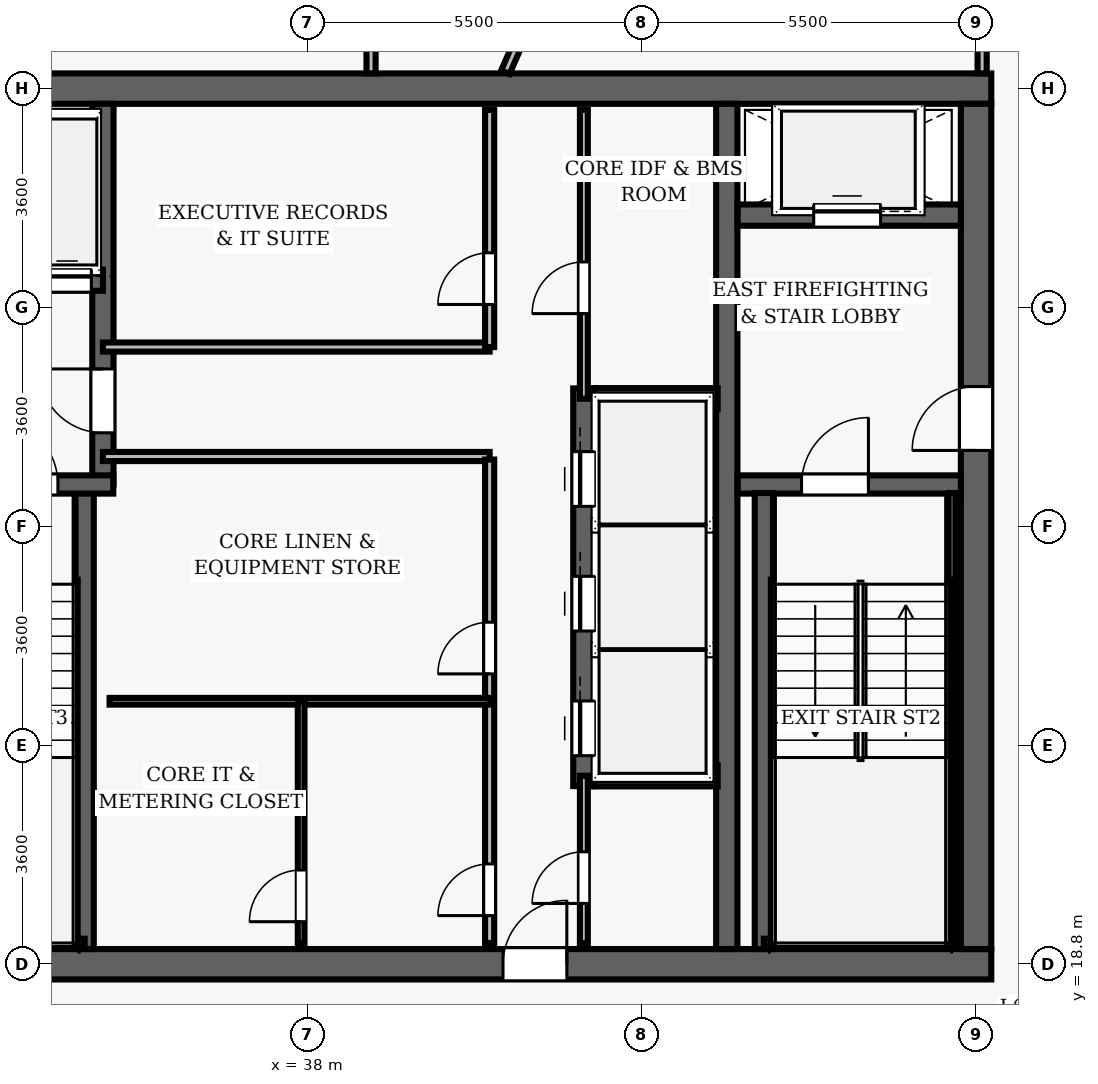
"""IFC4 building model, lengths in metres.
Left out: names, types, materials, properties, quantities, classifications, styles, units other than length and angle.
Written with IfcOpenShell. Run it as: python <this file> out.ifc"""

import sys

from ifc_helpers import new_model, si_unit, direction, frame, frame_2d, origin, place, context, subcontext, project, spatial, rectangle, extrude, element, fill, save


model = new_model("IFC4")
c1 = context("Model", 3, precision=1e-05, world=origin(), true_north=direction((0.0, 1.0)))
c2 = subcontext(c1, "Body", "Model", "MODEL_VIEW")
j1 = project(units=[si_unit("LENGTHUNIT", "METRE"), si_unit("PLANEANGLEUNIT", "RADIAN")], contexts=[c1])
p1 = place(None, origin())
s1 = spatial("IfcSite", under=j1, at=p1, CompositionType="ELEMENT")
p2 = place(p1, origin())
s2 = spatial("IfcBuilding", under=s1, at=p2, CompositionType="ELEMENT")
p3 = place(p2, frame((0.0, 0.0, 265.15)))
s3 = spatial("IfcBuildingStorey", under=s2, at=p3, CompositionType="ELEMENT", Elevation=265.15)
p4 = place(p3, frame((26.75, 18.8, 0.0), z_axis=(0.0, 0.0, 1.0), x_axis=(1.0, 0.0, 0.0)))
e1 = element("IfcWall", 1, at=p4, inside=s3, PredefinedType="SHEAR", context=c2, shape_type="SweptSolid", body=[
    extrude(rectangle(XDim=22.5, YDim=0.5, at=frame_2d((11.25, 0.0))), origin(), (0.0, 0.0, 1.0), 3.85),
])
p5 = place(p4, frame((14.47, 0.0, 0.0)))
e2 = element("IfcOpeningElement", 2, at=p5, cuts=e1, PredefinedType="OPENING", context=c2, shape_type="SweptSolid", body=[
    extrude(rectangle(XDim=1.05, YDim=2.15, at=frame_2d((0.525, 1.075))), frame((0.0, 0.26, 0.0), z_axis=(0.0, -1.0, 0.0), x_axis=(1.0, 0.0, 0.0)), (0.0, 0.0, 1.0), 0.52),
])
p6 = place(p3, frame((26.75, 33.2, 0.0), z_axis=(0.0, 0.0, 1.0), x_axis=(1.0, 0.0, 0.0)))
e3 = element("IfcWall", 3, at=p6, inside=s3, PredefinedType="SHEAR", context=c2, shape_type="SweptSolid", body=[
    extrude(rectangle(XDim=22.5, YDim=0.5, at=frame_2d((11.25, 0.0))), origin(), (0.0, 0.0, 1.0), 3.85),
])
p7 = place(p3, frame((49.0, 19.05, 0.0), z_axis=(0.0, 0.0, 1.0), x_axis=(0.0, 1.0, 0.0)))
e4 = element("IfcWall", 4, at=p7, inside=s3, PredefinedType="SHEAR", context=c2, shape_type="SweptSolid", body=[
    extrude(rectangle(XDim=13.9, YDim=0.5, at=frame_2d((6.95, 0.0))), origin(), (0.0, 0.0, 1.0), 3.85),
])
p8 = place(p7, frame((8.2, 0.0, 0.0)))
e5 = element("IfcOpeningElement", 5, at=p8, cuts=e4, PredefinedType="OPENING", context=c2, shape_type="SweptSolid", body=[
    extrude(rectangle(XDim=1.05, YDim=2.15, at=frame_2d((0.525, 1.075))), frame((0.0, 0.26, 0.0), z_axis=(0.0, -1.0, 0.0), x_axis=(1.0, 0.0, 0.0)), (0.0, 0.0, 1.0), 0.52),
])
p9 = place(p3, frame((44.9, 19.05, 0.0), z_axis=(0.0, 0.0, 1.0), x_axis=(0.0, 1.0, 0.0)))
e6 = element("IfcWall", 6, at=p9, inside=s3, PredefinedType="SHEAR", context=c2, shape_type="SweptSolid", body=[
    extrude(rectangle(XDim=13.9, YDim=0.35, at=frame_2d((6.95, 0.0))), origin(), (0.0, 0.0, 1.0), 3.85),
])
p10 = place(p3, frame((45.08, 26.69, 0.0), z_axis=(0.0, 0.0, 1.0), x_axis=(1.0, 0.0, 0.0)))
e7 = element("IfcWall", 7, at=p10, inside=s3, PredefinedType="SHEAR", context=c2, shape_type="SweptSolid", body=[
    extrude(rectangle(XDim=3.67, YDim=0.3, at=frame_2d((1.835, 0.0))), origin(), (0.0, 0.0, 1.0), 3.85),
])
p11 = place(p10, frame((1.05, 0.0, 0.0)))
e8 = element("IfcOpeningElement", 8, at=p11, cuts=e7, PredefinedType="OPENING", context=c2, shape_type="SweptSolid", body=[
    extrude(rectangle(XDim=1.1, YDim=2.15, at=frame_2d((0.55, 1.075))), frame((0.0, 0.16, 0.0), z_axis=(0.0, -1.0, 0.0), x_axis=(1.0, 0.0, 0.0)), (0.0, 0.0, 1.0), 0.32),
])
p12 = place(p3, frame((45.51, 19.05, 0.0), z_axis=(0.0, 0.0, 1.0), x_axis=(0.0, 1.0, 0.0)))
e9 = element("IfcWall", 9, at=p12, inside=s3, PredefinedType="SHEAR", context=c2, shape_type="SweptSolid", body=[
    extrude(rectangle(XDim=7.5, YDim=0.3, at=frame_2d((3.75, 0.0))), origin(), (0.0, 0.0, 1.0), 3.85),
])
p13 = place(p3, frame((48.605, 19.1, 0.0), z_axis=(0.0, 0.0, 1.0), x_axis=(0.0, 1.0, 0.0)))
e10 = element("IfcWall", 10, at=p13, inside=s3, PredefinedType="SHEAR", context=c2, shape_type="SweptSolid", body=[
    extrude(rectangle(XDim=7.45, YDim=0.12, at=frame_2d((3.725, 0.0))), origin(), (0.0, 0.0, 1.0), 3.85),
])
p14 = place(p3, frame((45.51, 19.16, 0.0), z_axis=(0.0, 0.0, 1.0), x_axis=(1.0, 0.0, 0.0)))
e11 = element("IfcWall", 11, at=p14, inside=s3, PredefinedType="SHEAR", context=c2, shape_type="SweptSolid", body=[
    extrude(rectangle(XDim=3.095, YDim=0.12, at=frame_2d((1.547, 0.0))), origin(), (0.0, 0.0, 1.0), 3.85),
])
p15 = place(p3, frame((45.08, 31.12, 0.0), z_axis=(0.0, 0.0, 1.0), x_axis=(1.0, 0.0, 0.0)))
e12 = element("IfcWall", 12, at=p15, inside=s3, PredefinedType="SHEAR", context=c2, shape_type="SweptSolid", body=[
    extrude(rectangle(XDim=3.67, YDim=0.35, at=frame_2d((1.835, 0.0))), origin(), (0.0, 0.0, 1.0), 3.04),
])
p16 = place(p15, frame((1.25, 0.0, 0.0)))
e13 = element("IfcOpeningElement", 13, at=p16, cuts=e12, PredefinedType="OPENING", context=c2, shape_type="SweptSolid", body=[
    extrude(rectangle(XDim=1.1, YDim=2.15, at=frame_2d((0.55, 1.075))), frame((0.0, 0.185, 0.0), z_axis=(0.0, -1.0, 0.0), x_axis=(1.0, 0.0, 0.0)), (0.0, 0.0, 1.0), 0.37),
])
p17 = place(p3, frame((34.34, 19.05, 0.0), z_axis=(0.0, 0.0, 1.0), x_axis=(0.0, 1.0, 0.0)))
e14 = element("IfcWall", 14, at=p17, inside=s3, PredefinedType="SHEAR", context=c2, shape_type="SweptSolid", body=[
    extrude(rectangle(XDim=7.5, YDim=0.3, at=frame_2d((3.75, 0.0))), origin(), (0.0, 0.0, 1.0), 3.85),
])
p18 = place(p3, frame((34.64, 26.69, 0.0), z_axis=(0.0, 0.0, 1.0), x_axis=(0.0, 1.0, 0.0)))
e15 = element("IfcWall", 15, at=p18, inside=s3, PredefinedType="SHEAR", context=c2, shape_type="SweptSolid", body=[
    extrude(rectangle(XDim=6.26, YDim=0.35, at=frame_2d((3.13, 0.0))), origin(), (0.0, 0.0, 1.0), 3.85),
])
p19 = place(p18, frame((0.85, 0.0, 0.0)))
e16 = element("IfcOpeningElement", 16, at=p19, cuts=e15, PredefinedType="OPENING", context=c2, shape_type="SweptSolid", body=[
    extrude(rectangle(XDim=1.05, YDim=2.15, at=frame_2d((0.525, 1.075))), frame((0.0, 0.185, 0.0), z_axis=(0.0, -1.0, 0.0), x_axis=(1.0, 0.0, 0.0)), (0.0, 0.0, 1.0), 0.37),
])
p20 = place(p3, frame((31.25, 26.69, 0.0), z_axis=(0.0, 0.0, 1.0), x_axis=(1.0, 0.0, 0.0)))
e17 = element("IfcWall", 17, at=p20, inside=s3, PredefinedType="SHEAR", context=c2, shape_type="SweptSolid", body=[
    extrude(rectangle(XDim=3.56, YDim=0.3, at=frame_2d((1.78, 0.0))), origin(), (0.0, 0.0, 1.0), 3.85),
])
p21 = place(p20, frame((1.55, 0.0, 0.0)))
e18 = element("IfcOpeningElement", 18, at=p21, cuts=e17, PredefinedType="OPENING", context=c2, shape_type="SweptSolid", body=[
    extrude(rectangle(XDim=1.1, YDim=2.15, at=frame_2d((0.55, 1.075))), frame((0.0, 0.16, 0.0), z_axis=(0.0, -1.0, 0.0), x_axis=(1.0, 0.0, 0.0)), (0.0, 0.0, 1.0), 0.32),
])
p22 = place(p3, frame((31.3, 19.16, 0.0), z_axis=(0.0, 0.0, 1.0), x_axis=(1.0, 0.0, 0.0)))
e19 = element("IfcWall", 19, at=p22, inside=s3, PredefinedType="SHEAR", context=c2, shape_type="SweptSolid", body=[
    extrude(rectangle(XDim=3.04, YDim=0.12, at=frame_2d((1.52, 0.0))), origin(), (0.0, 0.0, 1.0), 3.85),
])
p23 = place(p3, frame((32.23, 30.05, 0.0), z_axis=(0.0, 0.0, 1.0), x_axis=(1.0, 0.0, 0.0)))
e20 = element("IfcWall", 20, at=p23, inside=s3, PredefinedType="SHEAR", context=c2, shape_type="SweptSolid", body=[
    extrude(rectangle(XDim=2.41, YDim=0.35, at=frame_2d((1.205, 0.0))), origin(), (0.0, 0.0, 1.0), 3.04),
])
p24 = place(p23, frame((0.42, 0.0, 0.0)))
e21 = element("IfcOpeningElement", 21, at=p24, cuts=e20, PredefinedType="OPENING", context=c2, shape_type="SweptSolid", body=[
    extrude(rectangle(XDim=0.8, YDim=2.15, at=frame_2d((0.4, 1.075))), frame((0.0, 0.185, 0.0), z_axis=(0.0, -1.0, 0.0), x_axis=(1.0, 0.0, 0.0)), (0.0, 0.0, 1.0), 0.37),
])
p25 = place(p23, frame((1.42, 0.0, 0.0)))
e22 = element("IfcOpeningElement", 22, at=p25, cuts=e20, PredefinedType="OPENING", context=c2, shape_type="SweptSolid", body=[
    extrude(rectangle(XDim=0.8, YDim=2.15, at=frame_2d((0.4, 1.075))), frame((0.0, 0.185, 0.0), z_axis=(0.0, -1.0, 0.0), x_axis=(1.0, 0.0, 0.0)), (0.0, 0.0, 1.0), 0.37),
])
p26 = place(p3, frame((42.55, 21.73, 0.0), z_axis=(0.0, 0.0, 1.0), x_axis=(0.0, 1.0, 0.0)))
e23 = element("IfcWall", 23, at=p26, inside=s3, PredefinedType="SHEAR", context=c2, shape_type="SweptSolid", body=[
    extrude(rectangle(XDim=6.54, YDim=0.35, at=frame_2d((3.27, 0.0))), origin(), (0.0, 0.0, 1.0), 3.04),
])
p27 = place(p26, frame((0.5, 0.0, 0.0)))
e24 = element("IfcOpeningElement", 24, at=p27, cuts=e23, PredefinedType="OPENING", context=c2, shape_type="SweptSolid", body=[
    extrude(rectangle(XDim=0.9, YDim=2.15, at=frame_2d((0.45, 1.075))), frame((0.0, 0.185, 0.0), z_axis=(0.0, -1.0, 0.0), x_axis=(1.0, 0.0, 0.0)), (0.0, 0.0, 1.0), 0.37),
])
p28 = place(p26, frame((2.55, 0.0, 0.0)))
e25 = element("IfcOpeningElement", 25, at=p28, cuts=e23, PredefinedType="OPENING", context=c2, shape_type="SweptSolid", body=[
    extrude(rectangle(XDim=0.9, YDim=2.15, at=frame_2d((0.45, 1.075))), frame((0.0, 0.185, 0.0), z_axis=(0.0, -1.0, 0.0), x_axis=(1.0, 0.0, 0.0)), (0.0, 0.0, 1.0), 0.37),
])
p29 = place(p26, frame((4.6, 0.0, 0.0)))
e26 = element("IfcOpeningElement", 26, at=p29, cuts=e23, PredefinedType="OPENING", context=c2, shape_type="SweptSolid", body=[
    extrude(rectangle(XDim=0.9, YDim=2.15, at=frame_2d((0.45, 1.075))), frame((0.0, 0.185, 0.0), z_axis=(0.0, -1.0, 0.0), x_axis=(1.0, 0.0, 0.0)), (0.0, 0.0, 1.0), 0.37),
])
for number, where, z_axis, x_axis in (
    (27, (42.72, 21.9, 0.0), (0.0, 0.0, 1.0), (1.0, 0.0, 0.0)),
    (28, (42.72, 28.1, 0.0), (0.0, 0.0, 1.0), (1.0, 0.0, 0.0)),
):
    element("IfcWall", number, at=place(p3, frame(where, z_axis=z_axis, x_axis=x_axis)), inside=s3, PredefinedType="SHEAR", context=c2, shape_type="SweptSolid", body=[
        extrude(rectangle(XDim=2.03, YDim=0.35, at=frame_2d((1.015, 0.0))), origin(), (0.0, 0.0, 1.0), 3.04),
    ])
for number, where, z_axis, x_axis in (
    (29, (34.64, 27.15, 0.0), (0.0, 0.0, 1.0), (1.0, 0.0, 0.0)),
    (30, (34.64, 28.95, 0.0), (0.0, 0.0, 1.0), (1.0, 0.0, 0.0)),
):
    element("IfcWall", number, at=place(p3, frame(where, z_axis=z_axis, x_axis=x_axis)), inside=s3, PredefinedType="PARTITIONING", context=c2, shape_type="SweptSolid", body=[
        extrude(rectangle(XDim=6.36, YDim=0.15, at=frame_2d((3.18, 0.0))), origin(), (0.0, 0.0, 1.0), 3.04),
    ])
p30 = place(p3, frame((41.0, 28.95, 0.0), z_axis=(0.0, 0.0, 1.0), x_axis=(0.0, 1.0, 0.0)))
e31 = element("IfcWall", 31, at=p30, inside=s3, PredefinedType="PARTITIONING", context=c2, shape_type="SweptSolid", body=[
    extrude(rectangle(XDim=3.9, YDim=0.15, at=frame_2d((1.95, 0.0))), origin(), (0.0, 0.0, 1.0), 3.04),
])
p31 = place(p30, frame((0.7, 0.0, 0.0)))
e32 = element("IfcOpeningElement", 32, at=p31, cuts=e31, PredefinedType="OPENING", context=c2, shape_type="SweptSolid", body=[
    extrude(rectangle(XDim=0.85, YDim=2.1, at=frame_2d((0.425, 1.05))), frame((0.0, 0.085, 0.0), z_axis=(0.0, -1.0, 0.0), x_axis=(1.0, 0.0, 0.0)), (0.0, 0.0, 1.0), 0.17),
])
p32 = place(p3, frame((41.0, 19.15, 0.0), z_axis=(0.0, 0.0, 1.0), x_axis=(0.0, 1.0, 0.0)))
e33 = element("IfcWall", 33, at=p32, inside=s3, PredefinedType="PARTITIONING", context=c2, shape_type="SweptSolid", body=[
    extrude(rectangle(XDim=7.95, YDim=0.15, at=frame_2d((3.975, 0.0))), origin(), (0.0, 0.0, 1.0), 3.04),
])
p33 = place(p32, frame((4.425, 0.0, 0.0)))
e34 = element("IfcOpeningElement", 34, at=p33, cuts=e33, PredefinedType="OPENING", context=c2, shape_type="SweptSolid", body=[
    extrude(rectangle(XDim=0.85, YDim=2.1, at=frame_2d((0.425, 1.05))), frame((0.0, 0.085, 0.0), z_axis=(0.0, -1.0, 0.0), x_axis=(1.0, 0.0, 0.0)), (0.0, 0.0, 1.0), 0.17),
])
p34 = place(p32, frame((0.45, 0.0, 0.0)))
e35 = element("IfcOpeningElement", 35, at=p34, cuts=e33, PredefinedType="OPENING", context=c2, shape_type="SweptSolid", body=[
    extrude(rectangle(XDim=0.85, YDim=2.1, at=frame_2d((0.425, 1.05))), frame((0.0, 0.085, 0.0), z_axis=(0.0, -1.0, 0.0), x_axis=(1.0, 0.0, 0.0)), (0.0, 0.0, 1.0), 0.17),
])
p35 = place(p3, frame((34.75, 23.125, 0.0), z_axis=(0.0, 0.0, 1.0), x_axis=(1.0, 0.0, 0.0)))
e36 = element("IfcWall", 36, at=p35, inside=s3, PredefinedType="PARTITIONING", context=c2, shape_type="SweptSolid", body=[
    extrude(rectangle(XDim=6.25, YDim=0.11, at=frame_2d((3.125, 0.0))), origin(), (0.0, 0.0, 1.0), 3.04),
])
p36 = place(p3, frame((37.9, 19.15, 0.0), z_axis=(0.0, 0.0, 1.0), x_axis=(0.0, 1.0, 0.0)))
e37 = element("IfcWall", 37, at=p36, inside=s3, PredefinedType="PARTITIONING", context=c2, shape_type="SweptSolid", body=[
    extrude(rectangle(XDim=3.975, YDim=0.11, at=frame_2d((1.988, 0.0))), origin(), (0.0, 0.0, 1.0), 3.04),
])
p37 = place(p36, frame((0.35, 0.0, 0.0)))
e38 = element("IfcOpeningElement", 38, at=p37, cuts=e37, PredefinedType="OPENING", context=c2, shape_type="SweptSolid", body=[
    extrude(rectangle(XDim=0.85, YDim=2.1, at=frame_2d((0.425, 1.05))), frame((0.0, 0.065, 0.0), z_axis=(0.0, -1.0, 0.0), x_axis=(1.0, 0.0, 0.0)), (0.0, 0.0, 1.0), 0.13),
])
p38 = place(p3, frame((42.55, 28.1, 0.0), z_axis=(0.0, 0.0, 1.0), x_axis=(0.0, 1.0, 0.0)))
e39 = element("IfcWall", 39, at=p38, inside=s3, PredefinedType="PARTITIONING", context=c2, shape_type="SweptSolid", body=[
    extrude(rectangle(XDim=4.75, YDim=0.13, at=frame_2d((2.375, 0.0))), origin(), (0.0, 0.0, 1.0), 3.04),
])
p39 = place(p38, frame((1.4, 0.0, 0.0)))
e40 = element("IfcOpeningElement", 40, at=p39, cuts=e39, PredefinedType="OPENING", context=c2, shape_type="SweptSolid", body=[
    extrude(rectangle(XDim=0.85, YDim=2.1, at=frame_2d((0.425, 1.05))), frame((0.0, 0.075, 0.0), z_axis=(0.0, -1.0, 0.0), x_axis=(1.0, 0.0, 0.0)), (0.0, 0.0, 1.0), 0.15),
])
p40 = place(p3, frame((42.55, 19.15, 0.0), z_axis=(0.0, 0.0, 1.0), x_axis=(0.0, 1.0, 0.0)))
e41 = element("IfcWall", 41, at=p40, inside=s3, PredefinedType="PARTITIONING", context=c2, shape_type="SweptSolid", body=[
    extrude(rectangle(XDim=2.75, YDim=0.13, at=frame_2d((1.375, 0.0))), origin(), (0.0, 0.0, 1.0), 3.04),
])
p41 = place(p40, frame((0.65, 0.0, 0.0)))
e42 = element("IfcOpeningElement", 42, at=p41, cuts=e41, PredefinedType="OPENING", context=c2, shape_type="SweptSolid", body=[
    extrude(rectangle(XDim=0.85, YDim=2.1, at=frame_2d((0.425, 1.05))), frame((0.0, 0.075, 0.0), z_axis=(0.0, -1.0, 0.0), x_axis=(1.0, 0.0, 0.0)), (0.0, 0.0, 1.0), 0.15),
])
p42 = place(p3, frame((49.1, 33.45, 0.0), z_axis=(0.0, 0.0, 1.0), x_axis=(0.0, 1.0, 0.0)))
e43 = element("IfcWall", 43, at=p42, inside=s3, PredefinedType="PARTITIONING", context=c2, shape_type="SweptSolid", body=[
    extrude(rectangle(XDim=7.239, YDim=0.15, at=frame_2d((3.619, 0.0))), origin(), (0.0, 0.0, 1.0), 3.04),
])
p43 = place(p3, frame((39.05, 33.45, 0.0), z_axis=(0.0, 0.0, 1.0), x_axis=(0.0, 1.0, 0.0)))
e44 = element("IfcWall", 44, at=p43, inside=s3, PredefinedType="PARTITIONING", context=c2, shape_type="SweptSolid", body=[
    extrude(rectangle(XDim=6.95, YDim=0.15, at=frame_2d((3.475, 0.0))), origin(), (0.0, 0.0, 1.0), 3.04),
])
p44 = place(p43, frame((0.988, 0.0, 0.0)))
e45 = element("IfcOpeningElement", 45, at=p44, cuts=e44, PredefinedType="OPENING", context=c2, shape_type="SweptSolid", body=[
    extrude(rectangle(XDim=1.5, YDim=2.2, at=frame_2d((0.75, 1.1))), frame((0.0, 0.085, 0.0), z_axis=(0.0, -1.0, 0.0), x_axis=(1.0, 0.0, 0.0)), (0.0, 0.0, 1.0), 0.17),
])
p45 = place(p3, frame((41.259, 33.47, 0.0), z_axis=(0.0, 0.0, 1.0), x_axis=(0.399905988598, 0.916556163191, 0.0)))
e46 = element("IfcWall", 46, at=p45, inside=s3, PredefinedType="PARTITIONING", context=c2, shape_type="SweptSolid", body=[
    extrude(rectangle(XDim=12.602, YDim=0.15, at=frame_2d((6.301, 0.0))), origin(), (0.0, 0.0, 1.0), 3.04),
])
p46 = place(p11, origin())
e47 = element("IfcDoor", 47, at=p46, inside=s3, OperationType="SINGLE_SWING_RIGHT", PredefinedType="DOOR", context=c2, shape_type="SweptSolid", body=[
    extrude(rectangle(XDim=1.1, YDim=2.15, at=frame_2d((0.55, 1.075))), frame((0.0, 0.025, 0.0), z_axis=(0.0, -1.0, 0.0), x_axis=(1.0, 0.0, 0.0)), (0.0, 0.0, 1.0), 0.05),
])
fill(e8, e47)
p47 = place(p8, origin())
e48 = element("IfcDoor", 48, at=p47, inside=s3, OperationType="SINGLE_SWING_LEFT", PredefinedType="DOOR", context=c2, shape_type="SweptSolid", body=[
    extrude(rectangle(XDim=1.05, YDim=2.15, at=frame_2d((0.525, 1.075))), frame((0.0, 0.025, 0.0), z_axis=(0.0, -1.0, 0.0), x_axis=(1.0, 0.0, 0.0)), (0.0, 0.0, 1.0), 0.05),
])
fill(e5, e48)
p48 = place(p21, origin())
e49 = element("IfcDoor", 49, at=p48, inside=s3, OperationType="SINGLE_SWING_LEFT", PredefinedType="DOOR", context=c2, shape_type="SweptSolid", body=[
    extrude(rectangle(XDim=1.1, YDim=2.15, at=frame_2d((0.55, 1.075))), frame((0.0, 0.025, 0.0), z_axis=(0.0, -1.0, 0.0), x_axis=(1.0, 0.0, 0.0)), (0.0, 0.0, 1.0), 0.05),
])
fill(e18, e49)
p49 = place(p5, origin())
e50 = element("IfcDoor", 50, at=p49, inside=s3, OperationType="SINGLE_SWING_RIGHT", PredefinedType="DOOR", context=c2, shape_type="SweptSolid", body=[
    extrude(rectangle(XDim=1.05, YDim=2.15, at=frame_2d((0.525, 1.075))), frame((0.0, 0.025, 0.0), z_axis=(0.0, -1.0, 0.0), x_axis=(1.0, 0.0, 0.0)), (0.0, 0.0, 1.0), 0.05),
])
fill(e2, e50)
p50 = place(p19, origin())
e51 = element("IfcDoor", 51, at=p50, inside=s3, OperationType="SINGLE_SWING_RIGHT", PredefinedType="DOOR", context=c2, shape_type="SweptSolid", body=[
    extrude(rectangle(XDim=1.05, YDim=2.15, at=frame_2d((0.525, 1.075))), frame((0.0, 0.025, 0.0), z_axis=(0.0, -1.0, 0.0), x_axis=(1.0, 0.0, 0.0)), (0.0, 0.0, 1.0), 0.05),
])
fill(e16, e51)
p51 = place(p31, origin())
e52 = element("IfcDoor", 52, at=p51, inside=s3, OperationType="SINGLE_SWING_LEFT", PredefinedType="DOOR", context=c2, shape_type="SweptSolid", body=[
    extrude(rectangle(XDim=0.85, YDim=2.1, at=frame_2d((0.425, 1.05))), frame((0.0, 0.025, 0.0), z_axis=(0.0, -1.0, 0.0), x_axis=(1.0, 0.0, 0.0)), (0.0, 0.0, 1.0), 0.05),
])
fill(e32, e52)
p52 = place(p33, origin())
e53 = element("IfcDoor", 53, at=p52, inside=s3, OperationType="SINGLE_SWING_LEFT", PredefinedType="DOOR", context=c2, shape_type="SweptSolid", body=[
    extrude(rectangle(XDim=0.85, YDim=2.1, at=frame_2d((0.425, 1.05))), frame((0.0, 0.025, 0.0), z_axis=(0.0, -1.0, 0.0), x_axis=(1.0, 0.0, 0.0)), (0.0, 0.0, 1.0), 0.05),
])
fill(e34, e53)
p53 = place(p34, origin())
e54 = element("IfcDoor", 54, at=p53, inside=s3, OperationType="SINGLE_SWING_LEFT", PredefinedType="DOOR", context=c2, shape_type="SweptSolid", body=[
    extrude(rectangle(XDim=0.85, YDim=2.1, at=frame_2d((0.425, 1.05))), frame((0.0, 0.025, 0.0), z_axis=(0.0, -1.0, 0.0), x_axis=(1.0, 0.0, 0.0)), (0.0, 0.0, 1.0), 0.05),
])
fill(e35, e54)
p54 = place(p37, origin())
e55 = element("IfcDoor", 55, at=p54, inside=s3, OperationType="SINGLE_SWING_LEFT", PredefinedType="DOOR", context=c2, shape_type="SweptSolid", body=[
    extrude(rectangle(XDim=0.85, YDim=2.1, at=frame_2d((0.425, 1.05))), frame((0.0, 0.025, 0.0), z_axis=(0.0, -1.0, 0.0), x_axis=(1.0, 0.0, 0.0)), (0.0, 0.0, 1.0), 0.05),
])
fill(e38, e55)
p55 = place(p39, origin())
e56 = element("IfcDoor", 56, at=p55, inside=s3, OperationType="SINGLE_SWING_LEFT", PredefinedType="DOOR", context=c2, shape_type="SweptSolid", body=[
    extrude(rectangle(XDim=0.85, YDim=2.1, at=frame_2d((0.425, 1.05))), frame((0.0, 0.025, 0.0), z_axis=(0.0, -1.0, 0.0), x_axis=(1.0, 0.0, 0.0)), (0.0, 0.0, 1.0), 0.05),
])
fill(e40, e56)
p56 = place(p41, origin())
e57 = element("IfcDoor", 57, at=p56, inside=s3, OperationType="SINGLE_SWING_LEFT", PredefinedType="DOOR", context=c2, shape_type="SweptSolid", body=[
    extrude(rectangle(XDim=0.85, YDim=2.1, at=frame_2d((0.425, 1.05))), frame((0.0, 0.025, 0.0), z_axis=(0.0, -1.0, 0.0), x_axis=(1.0, 0.0, 0.0)), (0.0, 0.0, 1.0), 0.05),
])
fill(e42, e57)
p57 = place(p27, origin())
e58 = element("IfcDoor", 58, at=p57, inside=s3, OperationType="SLIDING_TO_LEFT", PredefinedType="DOOR", context=c2, shape_type="SweptSolid", body=[
    extrude(rectangle(XDim=0.9, YDim=2.15, at=frame_2d((0.45, 1.075))), frame((0.0, 0.025, 0.0), z_axis=(0.0, -1.0, 0.0), x_axis=(1.0, 0.0, 0.0)), (0.0, 0.0, 1.0), 0.05),
])
fill(e24, e58)
p58 = place(p28, origin())
e59 = element("IfcDoor", 59, at=p58, inside=s3, OperationType="SLIDING_TO_LEFT", PredefinedType="DOOR", context=c2, shape_type="SweptSolid", body=[
    extrude(rectangle(XDim=0.9, YDim=2.15, at=frame_2d((0.45, 1.075))), frame((0.0, 0.025, 0.0), z_axis=(0.0, -1.0, 0.0), x_axis=(1.0, 0.0, 0.0)), (0.0, 0.0, 1.0), 0.05),
])
fill(e25, e59)
p59 = place(p29, origin())
e60 = element("IfcDoor", 60, at=p59, inside=s3, OperationType="SLIDING_TO_LEFT", PredefinedType="DOOR", context=c2, shape_type="SweptSolid", body=[
    extrude(rectangle(XDim=0.9, YDim=2.15, at=frame_2d((0.45, 1.075))), frame((0.0, 0.025, 0.0), z_axis=(0.0, -1.0, 0.0), x_axis=(1.0, 0.0, 0.0)), (0.0, 0.0, 1.0), 0.05),
])
fill(e26, e60)
p60 = place(p16, origin())
e61 = element("IfcDoor", 61, at=p60, inside=s3, OperationType="SLIDING_TO_LEFT", PredefinedType="DOOR", context=c2, shape_type="SweptSolid", body=[
    extrude(rectangle(XDim=1.1, YDim=2.15, at=frame_2d((0.55, 1.075))), frame((0.0, 0.025, 0.0), z_axis=(0.0, -1.0, 0.0), x_axis=(1.0, 0.0, 0.0)), (0.0, 0.0, 1.0), 0.05),
])
fill(e13, e61)
p61 = place(p25, origin())
e62 = element("IfcDoor", 62, at=p61, inside=s3, OperationType="SLIDING_TO_LEFT", PredefinedType="DOOR", context=c2, shape_type="SweptSolid", body=[
    extrude(rectangle(XDim=0.8, YDim=2.15, at=frame_2d((0.4, 1.075))), frame((0.0, 0.025, 0.0), z_axis=(0.0, -1.0, 0.0), x_axis=(1.0, 0.0, 0.0)), (0.0, 0.0, 1.0), 0.05),
])
fill(e22, e62)
save(model, sys.argv[1])
